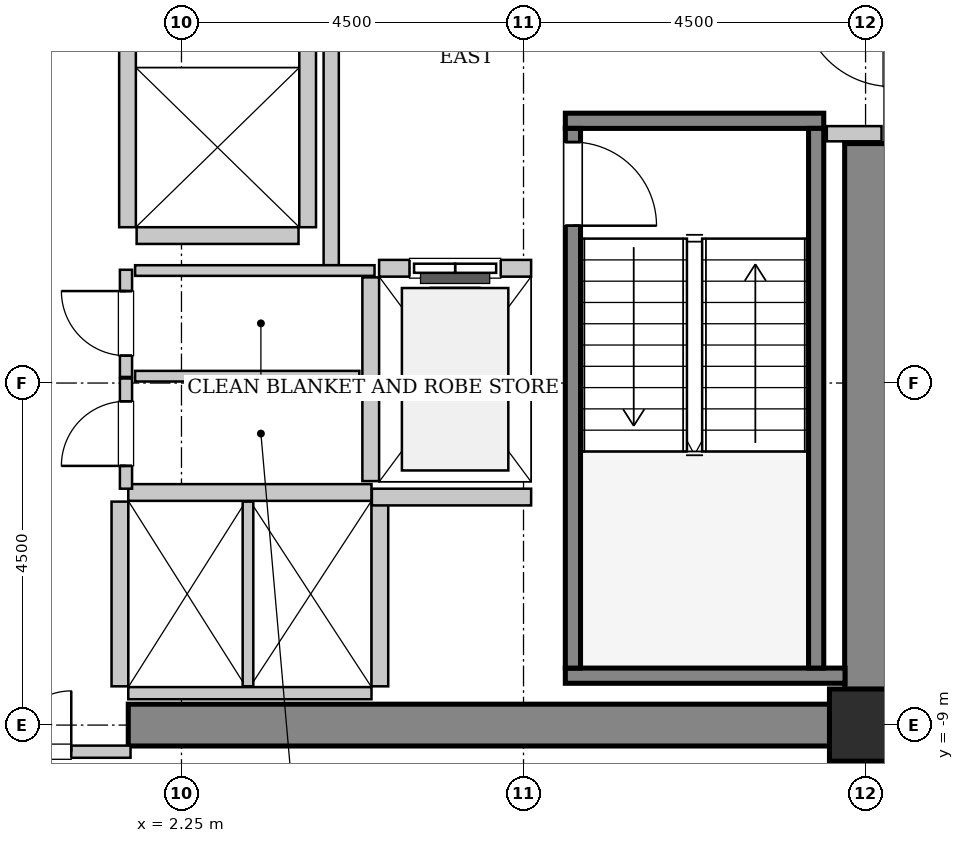
"""IFC4 building model, lengths in metres.
Left out: names, types, materials, properties, quantities, classifications, styles, units other than length and angle.
Written with IfcOpenShell. Run it as: python <this file> out.ifc"""

import sys

from ifc_helpers import new_model, si_unit, direction, frame, frame_2d, origin, origin_2d, place, context, subcontext, project, spatial, rectangle, hollow_rectangle, extrude, source, transform, mapped, element, fill, save


model = new_model("IFC4")
c1 = context("Model", 3, precision=1e-05, world=origin(), true_north=direction((0.0, 1.0)))
c2 = subcontext(c1, "Body", "Model", "MODEL_VIEW")
j1 = project(units=[si_unit("LENGTHUNIT", "METRE"), si_unit("PLANEANGLEUNIT", "RADIAN")], contexts=[c1])
p1 = place(None, origin())
s1 = spatial("IfcSite", under=j1, at=p1, CompositionType="ELEMENT")
p2 = place(p1, origin())
s2 = spatial("IfcBuilding", under=s1, at=p2, CompositionType="ELEMENT")
p3 = place(p2, frame((0.0, 0.0, 136.4)))
s3 = spatial("IfcBuildingStorey", under=s2, at=p3, CompositionType="ELEMENT", Elevation=136.4)
m1 = source(origin(), c2, "Body", "SweptSolid", [
    extrude(rectangle(XDim=9.975, YDim=0.55, at=frame_2d((4.987, 0.0))), origin(), (0.0, 0.0, 1.0), 3.8),
])
p4 = place(p3, frame((1.55, -9.0, 0.0), z_axis=(0.0, 0.0, 1.0), x_axis=(1.0, 0.0, 0.0)))
e1 = element("IfcWall", 1, at=p4, inside=s3, PredefinedType="SHEAR", context=c2, shape_type="MappedRepresentation", body=[
    mapped(m1, transform((0.0, 0.0, 0.0), x_axis=(1.0, 0.0, 0.0), y_axis=(0.0, 1.0, 0.0), z_axis=(0.0, 0.0, 1.0), scale=1.0)),
])
m2 = source(origin(), c2, "Body", "SweptSolid", [
    extrude(rectangle(XDim=7.375, YDim=0.55, at=frame_2d((3.688, 0.0))), origin(), (0.0, 0.0, 1.0), 3.8),
])
p5 = place(p3, frame((11.25, -8.725, 0.0), z_axis=(0.0, 0.0, 1.0), x_axis=(0.0, 1.0, 0.0)))
e2 = element("IfcWall", 2, at=p5, inside=s3, PredefinedType="SHEAR", context=c2, shape_type="MappedRepresentation", body=[
    mapped(m2, transform((0.0, 0.0, 0.0), x_axis=(1.0, 0.0, 0.0), y_axis=(0.0, 1.0, 0.0), z_axis=(0.0, 0.0, 1.0), scale=1.0)),
])
m3 = source(origin(), c2, "Body", "SweptSolid", [
    extrude(hollow_rectangle(XDim=0.95, YDim=0.95, WallThickness=0.045, InnerFilletRadius=0.045, OuterFilletRadius=0.09, at=origin_2d()), origin(), (0.0, 0.0, 1.0), 3.8),
])
p6 = place(p3, frame((11.25, -9.0, 0.0), z_axis=(0.0, 0.0, 1.0), x_axis=(1.0, 0.0, 0.0)))
e3 = element("IfcColumn", 3, at=p6, inside=s3, PredefinedType="COLUMN", context=c2, shape_type="MappedRepresentation", body=[
    mapped(m3, transform((0.0, 0.0, 0.0), x_axis=(1.0, 0.0, 0.0), y_axis=(0.0, 1.0, 0.0), z_axis=(0.0, 0.0, 1.0), scale=1.0)),
])
m4 = source(origin(), c2, "Body", "SweptSolid", [
    extrude(rectangle(XDim=3.4, YDim=0.2, at=frame_2d((1.7, 0.0))), origin(), (0.0, 0.0, 1.0), 3.8),
])
p7 = place(p3, frame((7.3, -1.05, 0.0), z_axis=(0.0, 0.0, 1.0), x_axis=(1.0, 0.0, 0.0)))
e4 = element("IfcWall", 4, at=p7, inside=s3, PredefinedType="SOLIDWALL", context=c2, shape_type="MappedRepresentation", body=[
    mapped(m4, transform((0.0, 0.0, 0.0), x_axis=(1.0, 0.0, 0.0), y_axis=(0.0, 1.0, 0.0), z_axis=(0.0, 0.0, 1.0), scale=1.0)),
])
m5 = source(origin(), c2, "Body", "SweptSolid", [
    extrude(rectangle(XDim=3.68, YDim=0.2, at=frame_2d((1.84, 0.0))), origin(), (0.0, 0.0, 1.0), 3.8),
])
p8 = place(p3, frame((7.3, -8.35, 0.0), z_axis=(0.0, 0.0, 1.0), x_axis=(1.0, 0.0, 0.0)))
e5 = element("IfcWall", 5, at=p8, inside=s3, PredefinedType="SOLIDWALL", context=c2, shape_type="MappedRepresentation", body=[
    mapped(m5, transform((0.0, 0.0, 0.0), x_axis=(1.0, 0.0, 0.0), y_axis=(0.0, 1.0, 0.0), z_axis=(0.0, 0.0, 1.0), scale=1.0)),
])
m6 = source(origin(), c2, "Body", "SweptSolid", [
    extrude(rectangle(XDim=7.1, YDim=0.2, at=frame_2d((3.55, 0.0))), origin(), (0.0, 0.0, 1.0), 3.8),
])
p9 = place(p3, frame((7.4, -1.15, 0.0), z_axis=(0.0, 0.0, 1.0), x_axis=(0.0, -1.0, 0.0)))
e6 = element("IfcWall", 6, at=p9, inside=s3, PredefinedType="SOLIDWALL", context=c2, shape_type="MappedRepresentation", body=[
    mapped(m6, transform((0.0, 0.0, 0.0), x_axis=(1.0, 0.0, 0.0), y_axis=(0.0, 1.0, 0.0), z_axis=(0.0, 0.0, 1.0), scale=1.0)),
])
p10 = place(p9, frame((0.18, 0.0, 0.0)))
e7 = element("IfcOpeningElement", 7, at=p10, cuts=e6, PredefinedType="OPENING", context=c2, shape_type="SweptSolid", body=[
    extrude(rectangle(XDim=1.1, YDim=2.15, at=frame_2d((0.55, 1.075))), frame((0.0, 0.11, 0.0), z_axis=(0.0, -1.0, 0.0), x_axis=(1.0, 0.0, 0.0)), (0.0, 0.0, 1.0), 0.22),
])
p11 = place(p3, frame((10.6, -1.15, 0.0), z_axis=(0.0, 0.0, 1.0), x_axis=(0.0, -1.0, 0.0)))
e8 = element("IfcWall", 8, at=p11, inside=s3, PredefinedType="SOLIDWALL", context=c2, shape_type="MappedRepresentation", body=[
    mapped(m6, transform((0.0, 0.0, 0.0), x_axis=(1.0, 0.0, 0.0), y_axis=(0.0, 1.0, 0.0), z_axis=(0.0, 0.0, 1.0), scale=1.0)),
])
m7 = source(origin(), c2, "Body", "SweptSolid", [
    extrude(rectangle(XDim=2.0, YDim=0.22, at=frame_2d((1.0, 0.0))), origin(), (0.0, 0.0, 1.0), 3.535),
])
p12 = place(p3, frame((6.85, -2.99, 0.0), z_axis=(0.0, 0.0, 1.0), x_axis=(-1.0, 0.0, 0.0)))
e9 = element("IfcWall", 9, at=p12, inside=s3, PredefinedType="SOLIDWALL", context=c2, shape_type="MappedRepresentation", body=[
    mapped(m7, transform((0.0, 0.0, 0.0), x_axis=(1.0, 0.0, 0.0), y_axis=(0.0, 1.0, 0.0), z_axis=(0.0, 0.0, 1.0), scale=1.0)),
])
p13 = place(p12, frame((0.4, 0.0, 0.0)))
e10 = element("IfcOpeningElement", 10, at=p13, cuts=e9, PredefinedType="OPENING", context=c2, shape_type="SweptSolid", body=[
    extrude(rectangle(XDim=1.2, YDim=2.2, at=frame_2d((0.6, 1.1))), frame((0.0, 0.12, 0.0), z_axis=(0.0, -1.0, 0.0), x_axis=(1.0, 0.0, 0.0)), (0.0, 0.0, 1.0), 0.24),
])
m8 = source(origin(), c2, "Body", "SweptSolid", [
    extrude(rectangle(XDim=2.68, YDim=0.22, at=frame_2d((1.34, 0.0))), origin(), (0.0, 0.0, 1.0), 3.535),
])
p14 = place(p3, frame((4.74, -3.11, 0.0), z_axis=(0.0, 0.0, 1.0), x_axis=(0.0, -1.0, 0.0)))
e11 = element("IfcWall", 11, at=p14, inside=s3, PredefinedType="SOLIDWALL", context=c2, shape_type="MappedRepresentation", body=[
    mapped(m8, transform((0.0, 0.0, 0.0), x_axis=(1.0, 0.0, 0.0), y_axis=(0.0, 1.0, 0.0), z_axis=(0.0, 0.0, 1.0), scale=1.0)),
])
m9 = source(origin(), c2, "Body", "SweptSolid", [
    extrude(rectangle(XDim=3.2, YDim=0.22, at=frame_2d((1.6, 0.0))), origin(), (0.0, 0.0, 1.0), 3.535),
])
p15 = place(p3, frame((4.75, -5.94, 0.0), z_axis=(0.0, 0.0, 1.0), x_axis=(-1.0, 0.0, 0.0)))
e12 = element("IfcWall", 12, at=p15, inside=s3, PredefinedType="SOLIDWALL", context=c2, shape_type="MappedRepresentation", body=[
    mapped(m9, transform((0.0, 0.0, 0.0), x_axis=(1.0, 0.0, 0.0), y_axis=(0.0, 1.0, 0.0), z_axis=(0.0, 0.0, 1.0), scale=1.0)),
])
m10 = source(origin(), c2, "Body", "SweptSolid", [
    extrude(rectangle(XDim=3.2, YDim=0.16, at=frame_2d((1.6, 0.0))), origin(), (0.0, 0.0, 1.0), 2.425),
])
p16 = place(p3, frame((1.55, -8.58, 0.0), z_axis=(0.0, 0.0, 1.0), x_axis=(1.0, 0.0, 0.0)))
e13 = element("IfcWall", 13, at=p16, inside=s3, PredefinedType="PARTITIONING", context=c2, shape_type="MappedRepresentation", body=[
    mapped(m10, transform((0.0, 0.0, 0.0), x_axis=(1.0, 0.0, 0.0), y_axis=(0.0, 1.0, 0.0), z_axis=(0.0, 0.0, 1.0), scale=1.0)),
])
m11 = source(origin(), c2, "Body", "SweptSolid", [
    extrude(rectangle(XDim=2.43, YDim=0.22, at=frame_2d((1.215, 0.0))), origin(), (0.0, 0.0, 1.0), 3.535),
])
p17 = place(p3, frame((1.44, -6.06, 0.0), z_axis=(0.0, 0.0, 1.0), x_axis=(0.0, -1.0, 0.0)))
e14 = element("IfcWall", 14, at=p17, inside=s3, PredefinedType="SOLIDWALL", context=c2, shape_type="MappedRepresentation", body=[
    mapped(m11, transform((0.0, 0.0, 0.0), x_axis=(1.0, 0.0, 0.0), y_axis=(0.0, 1.0, 0.0), z_axis=(0.0, 0.0, 1.0), scale=1.0)),
])
m12 = source(origin(), c2, "Body", "SweptSolid", [
    extrude(rectangle(XDim=2.43, YDim=0.14, at=frame_2d((1.215, 0.0))), origin(), (0.0, 0.0, 1.0), 3.535),
])
p18 = place(p3, frame((3.125, -8.49, 0.0), z_axis=(0.0, 0.0, 1.0), x_axis=(0.0, 1.0, 0.0)))
e15 = element("IfcWall", 15, at=p18, inside=s3, PredefinedType="PARTITIONING", context=c2, shape_type="MappedRepresentation", body=[
    mapped(m12, transform((0.0, 0.0, 0.0), x_axis=(1.0, 0.0, 0.0), y_axis=(0.0, 1.0, 0.0), z_axis=(0.0, 0.0, 1.0), scale=1.0)),
])
p19 = place(p3, frame((4.86, -8.49, 0.0), z_axis=(0.0, 0.0, 1.0), x_axis=(0.0, 1.0, 0.0)))
e16 = element("IfcWall", 16, at=p19, inside=s3, PredefinedType="SOLIDWALL", context=c2, shape_type="MappedRepresentation", body=[
    mapped(m11, transform((0.0, 0.0, 0.0), x_axis=(1.0, 0.0, 0.0), y_axis=(0.0, 1.0, 0.0), z_axis=(0.0, 0.0, 1.0), scale=1.0)),
])
m13 = source(origin(), c2, "Body", "SweptSolid", [
    extrude(rectangle(XDim=4.9, YDim=0.22, at=frame_2d((2.45, 0.0))), origin(), (0.0, 0.0, 1.0), 3.535),
])
for number, where, z_axis, x_axis in (
    (17, (1.54, 2.45, 0.0), (0.0, 0.0, 1.0), (0.0, -1.0, 0.0)),
    (18, (3.91, -2.45, 0.0), (0.0, 0.0, 1.0), (0.0, 1.0, 0.0)),
):
    element("IfcWall", number, at=place(p3, frame(where, z_axis=z_axis, x_axis=x_axis)), inside=s3, PredefinedType="SOLIDWALL", context=c2, shape_type="MappedRepresentation", body=[
        mapped(m13, transform((0.0, 0.0, 0.0), x_axis=(1.0, 0.0, 0.0), y_axis=(0.0, 1.0, 0.0), z_axis=(0.0, 0.0, 1.0), scale=1.0)),
    ])
m14 = source(origin(), c2, "Body", "SweptSolid", [
    extrude(rectangle(XDim=2.13, YDim=0.22, at=frame_2d((1.065, 0.0))), origin(), (0.0, 0.0, 1.0), 3.535),
])
p20 = place(p3, frame((1.66, -2.56, 0.0), z_axis=(0.0, 0.0, 1.0), x_axis=(1.0, 0.0, 0.0)))
e19 = element("IfcWall", 19, at=p20, inside=s3, PredefinedType="SOLIDWALL", context=c2, shape_type="MappedRepresentation", body=[
    mapped(m14, transform((0.0, 0.0, 0.0), x_axis=(1.0, 0.0, 0.0), y_axis=(0.0, 1.0, 0.0), z_axis=(0.0, 0.0, 1.0), scale=1.0)),
])
m15 = source(origin(), c2, "Body", "SweptSolid", [
    extrude(rectangle(XDim=2.095, YDim=0.22, at=frame_2d((1.048, 0.0))), origin(), (0.0, 0.0, 1.0), 3.535),
])
p21 = place(p3, frame((4.755, -6.0, 0.0), z_axis=(0.0, 0.0, 1.0), x_axis=(1.0, 0.0, 0.0)))
e20 = element("IfcWall", 20, at=p21, inside=s3, PredefinedType="SOLIDWALL", context=c2, shape_type="MappedRepresentation", body=[
    mapped(m15, transform((0.0, 0.0, 0.0), x_axis=(1.0, 0.0, 0.0), y_axis=(0.0, 1.0, 0.0), z_axis=(0.0, 0.0, 1.0), scale=1.0)),
])
m16 = source(origin(), c2, "Body", "SweptSolid", [
    extrude(rectangle(XDim=5.9, YDim=0.2, at=frame_2d((2.95, 0.0))), origin(), (0.0, 0.0, 1.0), 3.535),
])
p22 = place(p3, frame((4.22, -2.95, 0.0), z_axis=(0.0, 0.0, 1.0), x_axis=(0.0, 1.0, 0.0)))
e21 = element("IfcWall", 21, at=p22, inside=s3, PredefinedType="PARTITIONING", context=c2, shape_type="MappedRepresentation", body=[
    mapped(m16, transform((0.0, 0.0, 0.0), x_axis=(1.0, 0.0, 0.0), y_axis=(0.0, 1.0, 0.0), z_axis=(0.0, 0.0, 1.0), scale=1.0)),
])
m17 = source(origin(), c2, "Body", "SweptSolid", [
    extrude(rectangle(XDim=0.72, YDim=0.2, at=frame_2d((0.36, 0.0))), origin(), (0.0, 0.0, 1.0), 3.535),
])
p23 = place(p3, frame((10.74, -1.22, 0.0), z_axis=(0.0, 0.0, 1.0), x_axis=(1.0, 0.0, 0.0)))
e22 = element("IfcWall", 22, at=p23, inside=s3, PredefinedType="PARTITIONING", context=c2, shape_type="MappedRepresentation", body=[
    mapped(m17, transform((0.0, 0.0, 0.0), x_axis=(1.0, 0.0, 0.0), y_axis=(0.0, 1.0, 0.0), z_axis=(0.0, 0.0, 1.0), scale=1.0)),
])
m18 = source(origin(), c2, "Body", "SweptSolid", [
    extrude(rectangle(XDim=3.16, YDim=0.16, at=frame_2d((1.58, 0.0))), origin(), (0.0, 0.0, 1.0), 2.425),
])
p24 = place(p3, frame((-1.58, -9.35, 0.0), z_axis=(0.0, 0.0, 1.0), x_axis=(1.0, 0.0, 0.0)))
e23 = element("IfcWall", 23, at=p24, inside=s3, PredefinedType="PARTITIONING", context=c2, shape_type="MappedRepresentation", body=[
    mapped(m18, transform((0.0, 0.0, 0.0), x_axis=(1.0, 0.0, 0.0), y_axis=(0.0, 1.0, 0.0), z_axis=(0.0, 0.0, 1.0), scale=1.0)),
])
p25 = place(p24, frame((0.78, 0.0, 0.0)))
e24 = element("IfcOpeningElement", 24, at=p25, cuts=e23, PredefinedType="OPENING", context=c2, shape_type="SweptSolid", body=[
    extrude(rectangle(XDim=1.6, YDim=2.3, at=frame_2d((0.8, 1.15))), frame((0.0, 0.09, 0.0), z_axis=(0.0, -1.0, 0.0), x_axis=(1.0, 0.0, 0.0)), (0.0, 0.0, 1.0), 0.18),
])
m19 = source(origin(), c2, "Body", "SweptSolid", [
    extrude(rectangle(XDim=1.41, YDim=0.16, at=frame_2d((0.705, 0.0))), origin(), (0.0, 0.0, 1.0), 3.535),
])
p26 = place(p3, frame((1.52, -4.42, 0.0), z_axis=(0.0, 0.0, 1.0), x_axis=(0.0, 1.0, 0.0)))
e25 = element("IfcWall", 25, at=p26, inside=s3, PredefinedType="PARTITIONING", context=c2, shape_type="MappedRepresentation", body=[
    mapped(m19, transform((0.0, 0.0, 0.0), x_axis=(1.0, 0.0, 0.0), y_axis=(0.0, 1.0, 0.0), z_axis=(0.0, 0.0, 1.0), scale=1.0)),
])
p27 = place(p26, frame((0.28, 0.0, 0.0)))
e26 = element("IfcOpeningElement", 26, at=p27, cuts=e25, PredefinedType="OPENING", context=c2, shape_type="SweptSolid", body=[
    extrude(rectangle(XDim=0.85, YDim=2.1, at=frame_2d((0.425, 1.05))), frame((0.0, 0.09, 0.0), z_axis=(0.0, -1.0, 0.0), x_axis=(1.0, 0.0, 0.0)), (0.0, 0.0, 1.0), 0.18),
])
m20 = source(origin(), c2, "Body", "SweptSolid", [
    extrude(rectangle(XDim=3.15, YDim=0.14, at=frame_2d((1.575, 0.0))), origin(), (0.0, 0.0, 1.0), 3.535),
])
p28 = place(p3, frame((1.64, -3.02, 0.0), z_axis=(0.0, 0.0, 1.0), x_axis=(1.0, 0.0, 0.0)))
e27 = element("IfcWall", 27, at=p28, inside=s3, PredefinedType="PARTITIONING", context=c2, shape_type="MappedRepresentation", body=[
    mapped(m20, transform((0.0, 0.0, 0.0), x_axis=(1.0, 0.0, 0.0), y_axis=(0.0, 1.0, 0.0), z_axis=(0.0, 0.0, 1.0), scale=1.0)),
])
m21 = source(origin(), c2, "Body", "SweptSolid", [
    extrude(rectangle(XDim=2.95, YDim=0.14, at=frame_2d((1.475, 0.0))), origin(), (0.0, 0.0, 1.0), 3.535),
])
p29 = place(p3, frame((1.64, -4.41, 0.0), z_axis=(0.0, 0.0, 1.0), x_axis=(1.0, 0.0, 0.0)))
e28 = element("IfcWall", 28, at=p29, inside=s3, PredefinedType="PARTITIONING", context=c2, shape_type="MappedRepresentation", body=[
    mapped(m21, transform((0.0, 0.0, 0.0), x_axis=(1.0, 0.0, 0.0), y_axis=(0.0, 1.0, 0.0), z_axis=(0.0, 0.0, 1.0), scale=1.0)),
])
m22 = source(origin(), c2, "Body", "SweptSolid", [
    extrude(rectangle(XDim=1.45, YDim=0.16, at=frame_2d((0.725, 0.0))), origin(), (0.0, 0.0, 1.0), 3.535),
])
p30 = place(p3, frame((1.52, -5.89, 0.0), z_axis=(0.0, 0.0, 1.0), x_axis=(0.0, 1.0, 0.0)))
e29 = element("IfcWall", 29, at=p30, inside=s3, PredefinedType="PARTITIONING", context=c2, shape_type="MappedRepresentation", body=[
    mapped(m22, transform((0.0, 0.0, 0.0), x_axis=(1.0, 0.0, 0.0), y_axis=(0.0, 1.0, 0.0), z_axis=(0.0, 0.0, 1.0), scale=1.0)),
])
p31 = place(p30, frame((0.3, 0.0, 0.0)))
e30 = element("IfcOpeningElement", 30, at=p31, cuts=e29, PredefinedType="OPENING", context=c2, shape_type="SweptSolid", body=[
    extrude(rectangle(XDim=0.85, YDim=2.1, at=frame_2d((0.425, 1.05))), frame((0.0, 0.09, 0.0), z_axis=(0.0, -1.0, 0.0), x_axis=(1.0, 0.0, 0.0)), (0.0, 0.0, 1.0), 0.18),
])
m23 = source(origin(), c2, "Body", "SweptSolid", [
    extrude(rectangle(XDim=1.1, YDim=2.15, at=frame_2d((0.55, 1.075))), frame((0.0, 0.025, 0.0), z_axis=(0.0, -1.0, 0.0), x_axis=(1.0, 0.0, 0.0)), (0.0, 0.0, 1.0), 0.05),
])
p32 = place(p10, origin())
e31 = element("IfcDoor", 31, at=p32, inside=s3, OperationType="SINGLE_SWING_RIGHT", PredefinedType="DOOR", context=c2, shape_type="MappedRepresentation", body=[
    mapped(m23, transform((0.0, 0.0, 0.0), x_axis=(1.0, 0.0, 0.0), y_axis=(0.0, 1.0, 0.0), z_axis=(0.0, 0.0, 1.0), scale=1.0)),
])
fill(e7, e31)
m24 = source(origin(), c2, "Body", "SweptSolid", [
    extrude(rectangle(XDim=1.2, YDim=2.2, at=frame_2d((0.6, 1.1))), frame((0.0, 0.025, 0.0), z_axis=(0.0, -1.0, 0.0), x_axis=(1.0, 0.0, 0.0)), (0.0, 0.0, 1.0), 0.05),
])
p33 = place(p13, origin())
e32 = element("IfcDoor", 32, at=p33, inside=s3, OperationType="SLIDING_TO_LEFT", PredefinedType="DOOR", context=c2, shape_type="MappedRepresentation", body=[
    mapped(m24, transform((0.0, 0.0, 0.0), x_axis=(1.0, 0.0, 0.0), y_axis=(0.0, 1.0, 0.0), z_axis=(0.0, 0.0, 1.0), scale=1.0)),
])
fill(e10, e32)
m25 = source(origin(), c2, "Body", "SweptSolid", [
    extrude(rectangle(XDim=1.6, YDim=2.3, at=frame_2d((0.8, 1.15))), frame((0.0, 0.025, 0.0), z_axis=(0.0, -1.0, 0.0), x_axis=(1.0, 0.0, 0.0)), (0.0, 0.0, 1.0), 0.05),
])
p34 = place(p25, origin())
e33 = element("IfcDoor", 33, at=p34, inside=s3, OperationType="DOUBLE_DOOR_SINGLE_SWING", PredefinedType="DOOR", context=c2, shape_type="MappedRepresentation", body=[
    mapped(m25, transform((0.0, 0.0, 0.0), x_axis=(1.0, 0.0, 0.0), y_axis=(0.0, 1.0, 0.0), z_axis=(0.0, 0.0, 1.0), scale=1.0)),
])
fill(e24, e33)
m26 = source(origin(), c2, "Body", "SweptSolid", [
    extrude(rectangle(XDim=0.85, YDim=2.1, at=frame_2d((0.425, 1.05))), frame((0.0, 0.025, 0.0), z_axis=(0.0, -1.0, 0.0), x_axis=(1.0, 0.0, 0.0)), (0.0, 0.0, 1.0), 0.05),
])
p35 = place(p27, origin())
e34 = element("IfcDoor", 34, at=p35, inside=s3, OperationType="SINGLE_SWING_RIGHT", PredefinedType="DOOR", context=c2, shape_type="MappedRepresentation", body=[
    mapped(m26, transform((0.0, 0.0, 0.0), x_axis=(1.0, 0.0, 0.0), y_axis=(0.0, 1.0, 0.0), z_axis=(0.0, 0.0, 1.0), scale=1.0)),
])
fill(e26, e34)
p36 = place(p31, origin())
e35 = element("IfcDoor", 35, at=p36, inside=s3, OperationType="SINGLE_SWING_LEFT", PredefinedType="DOOR", context=c2, shape_type="MappedRepresentation", body=[
    mapped(m26, transform((0.0, 0.0, 0.0), x_axis=(1.0, 0.0, 0.0), y_axis=(0.0, 1.0, 0.0), z_axis=(0.0, 0.0, 1.0), scale=1.0)),
])
fill(e30, e35)
save(model, sys.argv[1])
